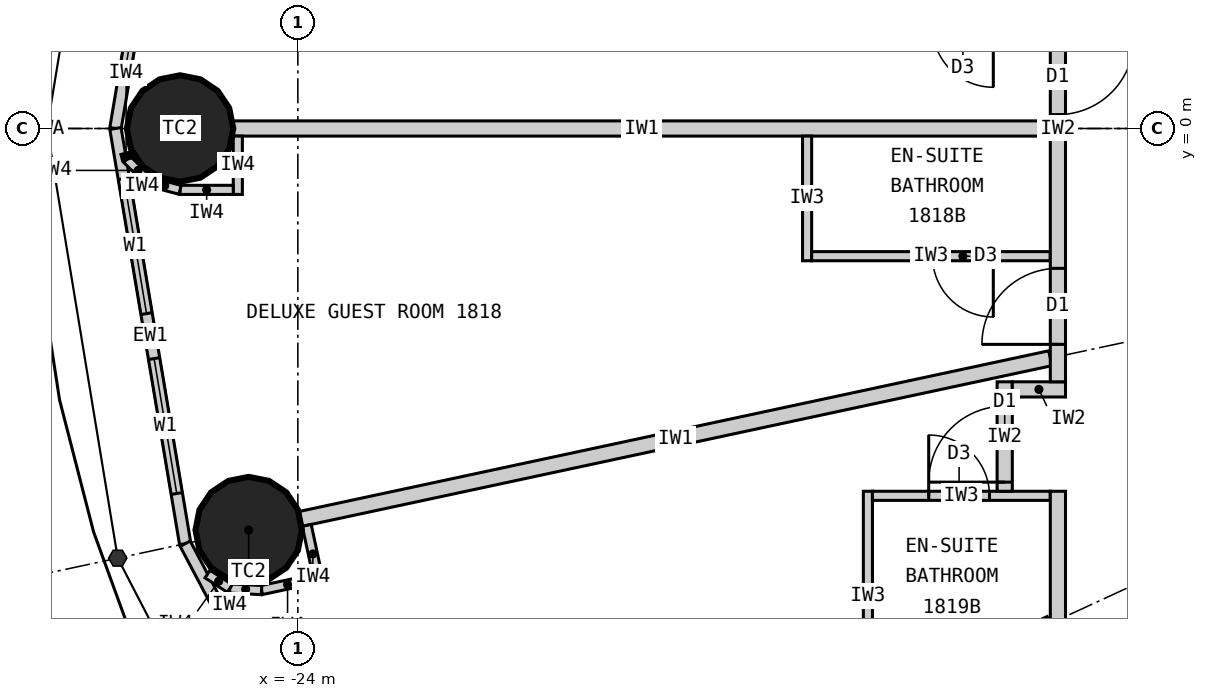
"""IFC4 building model, lengths in metres.
Left out: names, types, materials, properties, quantities, classifications, styles, units other than length and angle.
Written with IfcOpenShell. Run it as: python <this file> out.ifc"""

import sys

from ifc_helpers import new_model, si_unit, direction, frame, frame_2d, origin, origin_2d, place, context, subcontext, project, spatial, rectangle, circle, extrude, element, fill, save


model = new_model("IFC4")
c1 = context("Model", 3, precision=1e-05, world=origin(), true_north=direction((0.0, 1.0)))
c2 = subcontext(c1, "Body", "Model", "MODEL_VIEW")
j1 = project(units=[si_unit("LENGTHUNIT", "METRE"), si_unit("PLANEANGLEUNIT", "RADIAN")], contexts=[c1])
p1 = place(None, origin())
s1 = spatial("IfcSite", under=j1, at=p1, CompositionType="ELEMENT")
p2 = place(p1, origin())
s2 = spatial("IfcBuilding", under=s1, at=p2, CompositionType="ELEMENT")
p3 = place(p2, frame((0.0, 0.0, 73.8)))
s3 = spatial("IfcBuildingStorey", under=s2, at=p3, CompositionType="ELEMENT", Elevation=73.8)
for number, where, z_axis, x_axis in (
    (1, (-25.55, 0.0, 0.0), (0.0, 0.0, 1.0), (1.0, 0.0, 0.0)),
    (2, (-24.647, -5.283, 0.0), (0.0, 0.0, 1.0), (1.0, 0.0, 0.0)),
):
    element("IfcColumn", number, at=place(p3, frame(where, z_axis=z_axis, x_axis=x_axis)), inside=s3, PredefinedType="COLUMN", context=c2, shape_type="SweptSolid", body=[
        extrude(circle(Radius=0.7, at=origin_2d()), origin(), (0.0, 0.0, 1.0), 3.3),
    ])
p4 = place(p3, frame((-25.482, 5.462, 0.0), z_axis=(0.0, 0.0, 1.0), x_axis=(-0.165642551694, -0.986185857264, 0.0)))
e3 = element("IfcWall", 3, at=p4, inside=s3, PredefinedType="ELEMENTEDWALL", context=c2, shape_type="SweptSolid", body=[
    extrude(rectangle(XDim=5.539, YDim=0.15, at=frame_2d((2.77, 0.0))), origin(), (0.0, 0.0, 1.0), 3.12),
])
p5 = place(p4, frame((0.669, 0.0, 0.9)))
e4 = element("IfcOpeningElement", 4, at=p5, cuts=e3, PredefinedType="OPENING", context=c2, shape_type="SweptSolid", body=[
    extrude(rectangle(XDim=1.8, YDim=1.9, at=frame_2d((0.9, 0.95))), frame((0.0, 0.085, 0.0), z_axis=(0.0, -1.0, 0.0), x_axis=(1.0, 0.0, 0.0)), (0.0, 0.0, 1.0), 0.17),
])
p6 = place(p4, frame((3.07, 0.0, 0.9)))
e5 = element("IfcOpeningElement", 5, at=p6, cuts=e3, PredefinedType="OPENING", context=c2, shape_type="SweptSolid", body=[
    extrude(rectangle(XDim=1.8, YDim=1.9, at=frame_2d((0.9, 0.95))), frame((0.0, 0.085, 0.0), z_axis=(0.0, -1.0, 0.0), x_axis=(1.0, 0.0, 0.0)), (0.0, 0.0, 1.0), 0.17),
])
p7 = place(p3, frame((-26.4, 0.0, 0.0), z_axis=(0.0, 0.0, 1.0), x_axis=(0.165642551694, -0.986185857264, 0.0)))
e6 = element("IfcWall", 6, at=p7, inside=s3, PredefinedType="ELEMENTEDWALL", context=c2, shape_type="SweptSolid", body=[
    extrude(rectangle(XDim=5.539, YDim=0.15, at=frame_2d((2.77, 0.0))), origin(), (0.0, 0.0, 1.0), 3.12),
])
p8 = place(p7, frame((0.669, 0.0, 0.9)))
e7 = element("IfcOpeningElement", 7, at=p8, cuts=e6, PredefinedType="OPENING", context=c2, shape_type="SweptSolid", body=[
    extrude(rectangle(XDim=1.8, YDim=1.9, at=frame_2d((0.9, 0.95))), frame((0.0, 0.085, 0.0), z_axis=(0.0, -1.0, 0.0), x_axis=(1.0, 0.0, 0.0)), (0.0, 0.0, 1.0), 0.17),
])
p9 = place(p7, frame((3.07, 0.0, 0.9)))
e8 = element("IfcOpeningElement", 8, at=p9, cuts=e6, PredefinedType="OPENING", context=c2, shape_type="SweptSolid", body=[
    extrude(rectangle(XDim=1.8, YDim=1.9, at=frame_2d((0.9, 0.95))), frame((0.0, 0.085, 0.0), z_axis=(0.0, -1.0, 0.0), x_axis=(1.0, 0.0, 0.0)), (0.0, 0.0, 1.0), 0.17),
])
p10 = place(p3, frame((-25.482, -5.462, 0.0), z_axis=(0.0, 0.0, 1.0), x_axis=(0.467296867008, -0.884100468321, 0.0)))
e9 = element("IfcWall", 9, at=p10, inside=s3, PredefinedType="ELEMENTEDWALL", context=c2, shape_type="SweptSolid", body=[
    extrude(rectangle(XDim=5.734, YDim=0.15, at=frame_2d((2.867, 0.0))), origin(), (0.0, 0.0, 1.0), 3.12),
])
p11 = place(p10, frame((0.767, 0.0, 0.9)))
e10 = element("IfcOpeningElement", 10, at=p11, cuts=e9, PredefinedType="OPENING", context=c2, shape_type="SweptSolid", body=[
    extrude(rectangle(XDim=1.8, YDim=1.9, at=frame_2d((0.9, 0.95))), frame((0.0, 0.085, 0.0), z_axis=(0.0, -1.0, 0.0), x_axis=(1.0, 0.0, 0.0)), (0.0, 0.0, 1.0), 0.17),
])
p12 = place(p10, frame((3.167, 0.0, 0.9)))
e11 = element("IfcOpeningElement", 11, at=p12, cuts=e9, PredefinedType="OPENING", context=c2, shape_type="SweptSolid", body=[
    extrude(rectangle(XDim=1.8, YDim=1.9, at=frame_2d((0.9, 0.95))), frame((0.0, 0.085, 0.0), z_axis=(0.0, -1.0, 0.0), x_axis=(1.0, 0.0, 0.0)), (0.0, 0.0, 1.0), 0.17),
])
p13 = place(p3, frame((-14.1, 0.0, 0.0), z_axis=(0.0, 0.0, 1.0), x_axis=(-1.0, 0.0, 0.0)))
e12 = element("IfcWall", 12, at=p13, inside=s3, PredefinedType="PARTITIONING", context=c2, shape_type="SweptSolid", body=[
    extrude(rectangle(XDim=10.75, YDim=0.2, at=frame_2d((5.375, 0.0))), origin(), (0.0, 0.0, 1.0), 2.27),
])
p14 = place(p3, frame((-14.1, -3.022, 0.0), z_axis=(0.0, 0.0, 1.0), x_axis=(-0.977790014929, -0.209586943072, 0.0)))
e13 = element("IfcWall", 13, at=p14, inside=s3, PredefinedType="PARTITIONING", context=c2, shape_type="SweptSolid", body=[
    extrude(rectangle(XDim=10.087, YDim=0.2, at=frame_2d((5.043, 0.0))), origin(), (0.0, 0.0, 1.0), 2.32),
])
p15 = place(p3, frame((-14.1, -6.512, 0.0), z_axis=(0.0, 0.0, 1.0), x_axis=(-0.907832871056, -0.419332181247, 0.0)))
e14 = element("IfcWall", 14, at=p15, inside=s3, PredefinedType="PARTITIONING", context=c2, shape_type="SweptSolid", body=[
    extrude(rectangle(XDim=8.023, YDim=0.2, at=frame_2d((4.011, 0.0))), origin(), (0.0, 0.0, 1.0), 2.32),
])
p16 = place(p3, frame((-17.3, -0.1, 0.0), z_axis=(0.0, 0.0, 1.0), x_axis=(0.0, -1.0, 0.0)))
e15 = element("IfcWall", 15, at=p16, inside=s3, PredefinedType="PARTITIONING", context=c2, shape_type="SweptSolid", body=[
    extrude(rectangle(XDim=1.64, YDim=0.12, at=frame_2d((0.82, 0.0))), origin(), (0.0, 0.0, 1.0), 3.12),
])
p17 = place(p3, frame((-14.1, -1.68, 0.0), z_axis=(0.0, 0.0, 1.0), x_axis=(-1.0, 0.0, 0.0)))
e16 = element("IfcWall", 16, at=p17, inside=s3, PredefinedType="PARTITIONING", context=c2, shape_type="SweptSolid", body=[
    extrude(rectangle(XDim=3.14, YDim=0.12, at=frame_2d((1.57, 0.0))), origin(), (0.0, 0.0, 1.0), 3.12),
])
p18 = place(p17, frame((0.75, 0.0, 0.0)))
e17 = element("IfcOpeningElement", 17, at=p18, cuts=e16, PredefinedType="OPENING", context=c2, shape_type="SweptSolid", body=[
    extrude(rectangle(XDim=0.8, YDim=2.1, at=frame_2d((0.4, 1.05))), frame((0.0, 0.07, 0.0), z_axis=(0.0, -1.0, 0.0), x_axis=(1.0, 0.0, 0.0)), (0.0, 0.0, 1.0), 0.14),
])
p19 = place(p3, frame((-16.5, -7.521, 0.0), z_axis=(0.0, 0.0, 1.0), x_axis=(0.0, 1.0, 0.0)))
e18 = element("IfcWall", 18, at=p19, inside=s3, PredefinedType="PARTITIONING", context=c2, shape_type="SweptSolid", body=[
    extrude(rectangle(XDim=2.749, YDim=0.12, at=frame_2d((1.374, 0.0))), origin(), (0.0, 0.0, 1.0), 3.12),
])
p20 = place(p3, frame((-14.1, -4.833, 0.0), z_axis=(0.0, 0.0, 1.0), x_axis=(-1.0, 0.0, 0.0)))
e19 = element("IfcWall", 19, at=p20, inside=s3, PredefinedType="PARTITIONING", context=c2, shape_type="SweptSolid", body=[
    extrude(rectangle(XDim=2.34, YDim=0.12, at=frame_2d((1.17, 0.0))), origin(), (0.0, 0.0, 1.0), 3.12),
])
p21 = place(p20, frame((0.8, 0.0, 0.0)))
e20 = element("IfcOpeningElement", 20, at=p21, cuts=e19, PredefinedType="OPENING", context=c2, shape_type="SweptSolid", body=[
    extrude(rectangle(XDim=0.8, YDim=2.1, at=frame_2d((0.4, 1.05))), frame((0.0, 0.07, 0.0), z_axis=(0.0, -1.0, 0.0), x_axis=(1.0, 0.0, 0.0)), (0.0, 0.0, 1.0), 0.14),
])
p22 = place(p3, frame((-14.7, -3.333, 0.0), z_axis=(0.0, 0.0, 1.0), x_axis=(0.0, -1.0, 0.0)))
e21 = element("IfcWall", 21, at=p22, inside=s3, PredefinedType="PARTITIONING", context=c2, shape_type="SweptSolid", body=[
    extrude(rectangle(XDim=1.44, YDim=0.2, at=frame_2d((0.72, 0.0))), origin(), (0.0, 0.0, 1.0), 3.12),
])
p23 = place(p22, frame((0.32, 0.0, 0.0)))
e22 = element("IfcOpeningElement", 22, at=p23, cuts=e21, PredefinedType="OPENING", context=c2, shape_type="SweptSolid", body=[
    extrude(rectangle(XDim=1.0, YDim=2.2, at=frame_2d((0.5, 1.1))), frame((0.0, 0.11, 0.0), z_axis=(0.0, -1.0, 0.0), x_axis=(1.0, 0.0, 0.0)), (0.0, 0.0, 1.0), 0.22),
])
p24 = place(p3, frame((-13.9, -3.433, 0.0), z_axis=(0.0, 0.0, 1.0), x_axis=(-1.0, 0.0, 0.0)))
e23 = element("IfcWall", 23, at=p24, inside=s3, PredefinedType="PARTITIONING", context=c2, shape_type="SweptSolid", body=[
    extrude(rectangle(XDim=0.7, YDim=0.2, at=frame_2d((0.35, 0.0))), origin(), (0.0, 0.0, 1.0), 2.32),
])
p25 = place(p3, frame((-14.0, 3.333, 0.0), z_axis=(0.0, 0.0, 1.0), x_axis=(0.0, -1.0, 0.0)))
e24 = element("IfcWall", 24, at=p25, inside=s3, PredefinedType="PARTITIONING", context=c2, shape_type="SweptSolid", body=[
    extrude(rectangle(XDim=6.665, YDim=0.2, at=frame_2d((3.333, 0.0))), origin(), (0.0, 0.0, 1.0), 3.12),
])
p26 = place(p25, frame((2.15, 0.0, 0.0)))
e25 = element("IfcOpeningElement", 25, at=p26, cuts=e24, PredefinedType="OPENING", context=c2, shape_type="SweptSolid", body=[
    extrude(rectangle(XDim=1.0, YDim=2.2, at=frame_2d((0.5, 1.1))), frame((0.0, 0.11, 0.0), z_axis=(0.0, -1.0, 0.0), x_axis=(1.0, 0.0, 0.0)), (0.0, 0.0, 1.0), 0.22),
])
p27 = place(p25, frame((5.173, 0.0, 0.0)))
e26 = element("IfcOpeningElement", 26, at=p27, cuts=e24, PredefinedType="OPENING", context=c2, shape_type="SweptSolid", body=[
    extrude(rectangle(XDim=1.0, YDim=2.2, at=frame_2d((0.5, 1.1))), frame((0.0, 0.11, 0.0), z_axis=(0.0, -1.0, 0.0), x_axis=(1.0, 0.0, 0.0)), (0.0, 0.0, 1.0), 0.22),
])
p28 = place(p3, frame((-14.0, -4.772, 0.0), z_axis=(0.0, 0.0, 1.0), x_axis=(0.0, -1.0, 0.0)))
e27 = element("IfcWall", 27, at=p28, inside=s3, PredefinedType="PARTITIONING", context=c2, shape_type="SweptSolid", body=[
    extrude(rectangle(XDim=5.127, YDim=0.2, at=frame_2d((2.564, 0.0))), origin(), (0.0, 0.0, 1.0), 3.12),
])
p29 = place(p28, frame((4.025, 0.0, 0.0)))
e28 = element("IfcOpeningElement", 28, at=p29, cuts=e27, PredefinedType="OPENING", context=c2, shape_type="SweptSolid", body=[
    extrude(rectangle(XDim=1.0, YDim=2.2, at=frame_2d((0.5, 1.1))), frame((0.0, 0.11, 0.0), z_axis=(0.0, -1.0, 0.0), x_axis=(1.0, 0.0, 0.0)), (0.0, 0.0, 1.0), 0.22),
])
p30 = place(p3, frame((-24.79, -0.1, 0.0), z_axis=(0.0, 0.0, 1.0), x_axis=(0.0, -1.0, 0.0)))
e29 = element("IfcWall", 29, at=p30, inside=s3, PredefinedType="PARTITIONING", context=c2, shape_type="SweptSolid", body=[
    extrude(rectangle(XDim=0.767, YDim=0.12, at=frame_2d((0.384, 0.0))), origin(), (0.0, 0.0, 1.0), 3.12),
])
p31 = place(p3, frame((-24.85, -0.808, 0.0), z_axis=(0.0, 0.0, 1.0), x_axis=(-1.0, 0.0, 0.0)))
e30 = element("IfcWall", 30, at=p31, inside=s3, PredefinedType="PARTITIONING", context=c2, shape_type="SweptSolid", body=[
    extrude(rectangle(XDim=0.7, YDim=0.12, at=frame_2d((0.35, 0.0))), origin(), (0.0, 0.0, 1.0), 3.12),
])
p32 = place(p3, frame((-25.55, -0.808, 0.0), z_axis=(0.0, 0.0, 1.0), x_axis=(-0.965807183573, 0.2592614205, 0.0)))
e31 = element("IfcWall", 31, at=p32, inside=s3, PredefinedType="PARTITIONING", context=c2, shape_type="SweptSolid", body=[
    extrude(rectangle(XDim=0.418, YDim=0.12, at=frame_2d((0.209, 0.0))), origin(), (0.0, 0.0, 1.0), 3.12),
])
p33 = place(p3, frame((-25.954, -0.699, 0.0), z_axis=(0.0, 0.0, 1.0), x_axis=(-0.707106781187, 0.707106781187, 0.0)))
e32 = element("IfcWall", 32, at=p33, inside=s3, PredefinedType="PARTITIONING", context=c2, shape_type="SweptSolid", body=[
    extrude(rectangle(XDim=0.418, YDim=0.12, at=frame_2d((0.209, 0.0))), origin(), (0.0, 0.0, 1.0), 3.12),
])
p34 = place(p3, frame((-26.249, -0.404, 0.0), z_axis=(0.0, 0.0, 1.0), x_axis=(-0.259754282609, 0.965674744759, 0.0)))
e33 = element("IfcWall", 33, at=p34, inside=s3, PredefinedType="PARTITIONING", context=c2, shape_type="SweptSolid", body=[
    extrude(rectangle(XDim=0.08, YDim=0.12, at=frame_2d((0.04, 0.0))), origin(), (0.0, 0.0, 1.0), 3.12),
])
p35 = place(p3, frame((-23.883, -5.222, 0.0), z_axis=(0.0, 0.0, 1.0), x_axis=(0.209311842415, -0.977848941619, 0.0)))
e34 = element("IfcWall", 34, at=p35, inside=s3, PredefinedType="PARTITIONING", context=c2, shape_type="SweptSolid", body=[
    extrude(rectangle(XDim=0.768, YDim=0.12, at=frame_2d((0.384, 0.0))), origin(), (0.0, 0.0, 1.0), 3.12),
])
p36 = place(p3, frame((-23.793, -5.926, 0.0), z_axis=(0.0, 0.0, 1.0), x_axis=(-0.977792206673, -0.209576717621, 0.0)))
e35 = element("IfcWall", 35, at=p36, inside=s3, PredefinedType="PARTITIONING", context=c2, shape_type="SweptSolid", body=[
    extrude(rectangle(XDim=0.7, YDim=0.12, at=frame_2d((0.35, 0.0))), origin(), (0.0, 0.0, 1.0), 3.12),
])
p37 = place(p3, frame((-24.478, -6.073, 0.0), z_axis=(0.0, 0.0, 1.0), x_axis=(-0.998708262812, 0.05081147302, 0.0)))
e36 = element("IfcWall", 36, at=p37, inside=s3, PredefinedType="PARTITIONING", context=c2, shape_type="SweptSolid", body=[
    extrude(rectangle(XDim=0.418, YDim=0.12, at=frame_2d((0.209, 0.0))), origin(), (0.0, 0.0, 1.0), 3.12),
])
p38 = place(p3, frame((-24.895, -6.052, 0.0), z_axis=(0.0, 0.0, 1.0), x_axis=(-0.839495197275, 0.54336710772, 0.0)))
e37 = element("IfcWall", 37, at=p38, inside=s3, PredefinedType="PARTITIONING", context=c2, shape_type="SweptSolid", body=[
    extrude(rectangle(XDim=0.35, YDim=0.12, at=frame_2d((0.175, 0.0))), origin(), (0.0, 0.0, 1.0), 3.12),
])
p39 = place(p6, origin())
e38 = element("IfcWindow", 38, at=p39, inside=s3, PartitioningType="SINGLE_PANEL", PredefinedType="WINDOW", context=c2, shape_type="SweptSolid", body=[
    extrude(rectangle(XDim=1.8, YDim=1.9, at=frame_2d((0.9, 0.95))), frame((0.0, 0.03, 0.0), z_axis=(0.0, -1.0, 0.0), x_axis=(1.0, 0.0, 0.0)), (0.0, 0.0, 1.0), 0.06),
])
fill(e5, e38)
p40 = place(p8, origin())
e39 = element("IfcWindow", 39, at=p40, inside=s3, PartitioningType="SINGLE_PANEL", PredefinedType="WINDOW", context=c2, shape_type="SweptSolid", body=[
    extrude(rectangle(XDim=1.8, YDim=1.9, at=frame_2d((0.9, 0.95))), frame((0.0, 0.03, 0.0), z_axis=(0.0, -1.0, 0.0), x_axis=(1.0, 0.0, 0.0)), (0.0, 0.0, 1.0), 0.06),
])
fill(e7, e39)
p41 = place(p9, origin())
e40 = element("IfcWindow", 40, at=p41, inside=s3, PartitioningType="SINGLE_PANEL", PredefinedType="WINDOW", context=c2, shape_type="SweptSolid", body=[
    extrude(rectangle(XDim=1.8, YDim=1.9, at=frame_2d((0.9, 0.95))), frame((0.0, 0.03, 0.0), z_axis=(0.0, -1.0, 0.0), x_axis=(1.0, 0.0, 0.0)), (0.0, 0.0, 1.0), 0.06),
])
fill(e8, e40)
p42 = place(p11, origin())
e41 = element("IfcWindow", 41, at=p42, inside=s3, PartitioningType="SINGLE_PANEL", PredefinedType="WINDOW", context=c2, shape_type="SweptSolid", body=[
    extrude(rectangle(XDim=1.8, YDim=1.9, at=frame_2d((0.9, 0.95))), frame((0.0, 0.03, 0.0), z_axis=(0.0, -1.0, 0.0), x_axis=(1.0, 0.0, 0.0)), (0.0, 0.0, 1.0), 0.06),
])
fill(e10, e41)
p43 = place(p26, origin())
e42 = element("IfcDoor", 42, at=p43, inside=s3, OperationType="SINGLE_SWING_LEFT", PredefinedType="DOOR", context=c2, shape_type="SweptSolid", body=[
    extrude(rectangle(XDim=1.0, YDim=2.2, at=frame_2d((0.5, 1.1))), frame((0.0, 0.025, 0.0), z_axis=(0.0, -1.0, 0.0), x_axis=(1.0, 0.0, 0.0)), (0.0, 0.0, 1.0), 0.05),
])
fill(e25, e42)
p44 = place(p18, origin())
e43 = element("IfcDoor", 43, at=p44, inside=s3, OperationType="SINGLE_SWING_LEFT", PredefinedType="DOOR", context=c2, shape_type="SweptSolid", body=[
    extrude(rectangle(XDim=0.8, YDim=2.1, at=frame_2d((0.4, 1.05))), frame((0.0, 0.025, 0.0), z_axis=(0.0, -1.0, 0.0), x_axis=(1.0, 0.0, 0.0)), (0.0, 0.0, 1.0), 0.05),
])
fill(e17, e43)
p45 = place(p27, origin())
e44 = element("IfcDoor", 44, at=p45, inside=s3, OperationType="SINGLE_SWING_RIGHT", PredefinedType="DOOR", context=c2, shape_type="SweptSolid", body=[
    extrude(rectangle(XDim=1.0, YDim=2.2, at=frame_2d((0.5, 1.1))), frame((0.0, 0.025, 0.0), z_axis=(0.0, -1.0, 0.0), x_axis=(1.0, 0.0, 0.0)), (0.0, 0.0, 1.0), 0.05),
])
fill(e26, e44)
p46 = place(p21, origin())
e45 = element("IfcDoor", 45, at=p46, inside=s3, OperationType="SINGLE_SWING_RIGHT", PredefinedType="DOOR", context=c2, shape_type="SweptSolid", body=[
    extrude(rectangle(XDim=0.8, YDim=2.1, at=frame_2d((0.4, 1.05))), frame((0.0, 0.025, 0.0), z_axis=(0.0, -1.0, 0.0), x_axis=(1.0, 0.0, 0.0)), (0.0, 0.0, 1.0), 0.05),
])
fill(e20, e45)
p47 = place(p23, origin())
e46 = element("IfcDoor", 46, at=p47, inside=s3, OperationType="SINGLE_SWING_RIGHT", PredefinedType="DOOR", context=c2, shape_type="SweptSolid", body=[
    extrude(rectangle(XDim=1.0, YDim=2.2, at=frame_2d((0.5, 1.1))), frame((0.0, 0.025, 0.0), z_axis=(0.0, -1.0, 0.0), x_axis=(1.0, 0.0, 0.0)), (0.0, 0.0, 1.0), 0.05),
])
fill(e22, e46)
save(model, sys.argv[1])
